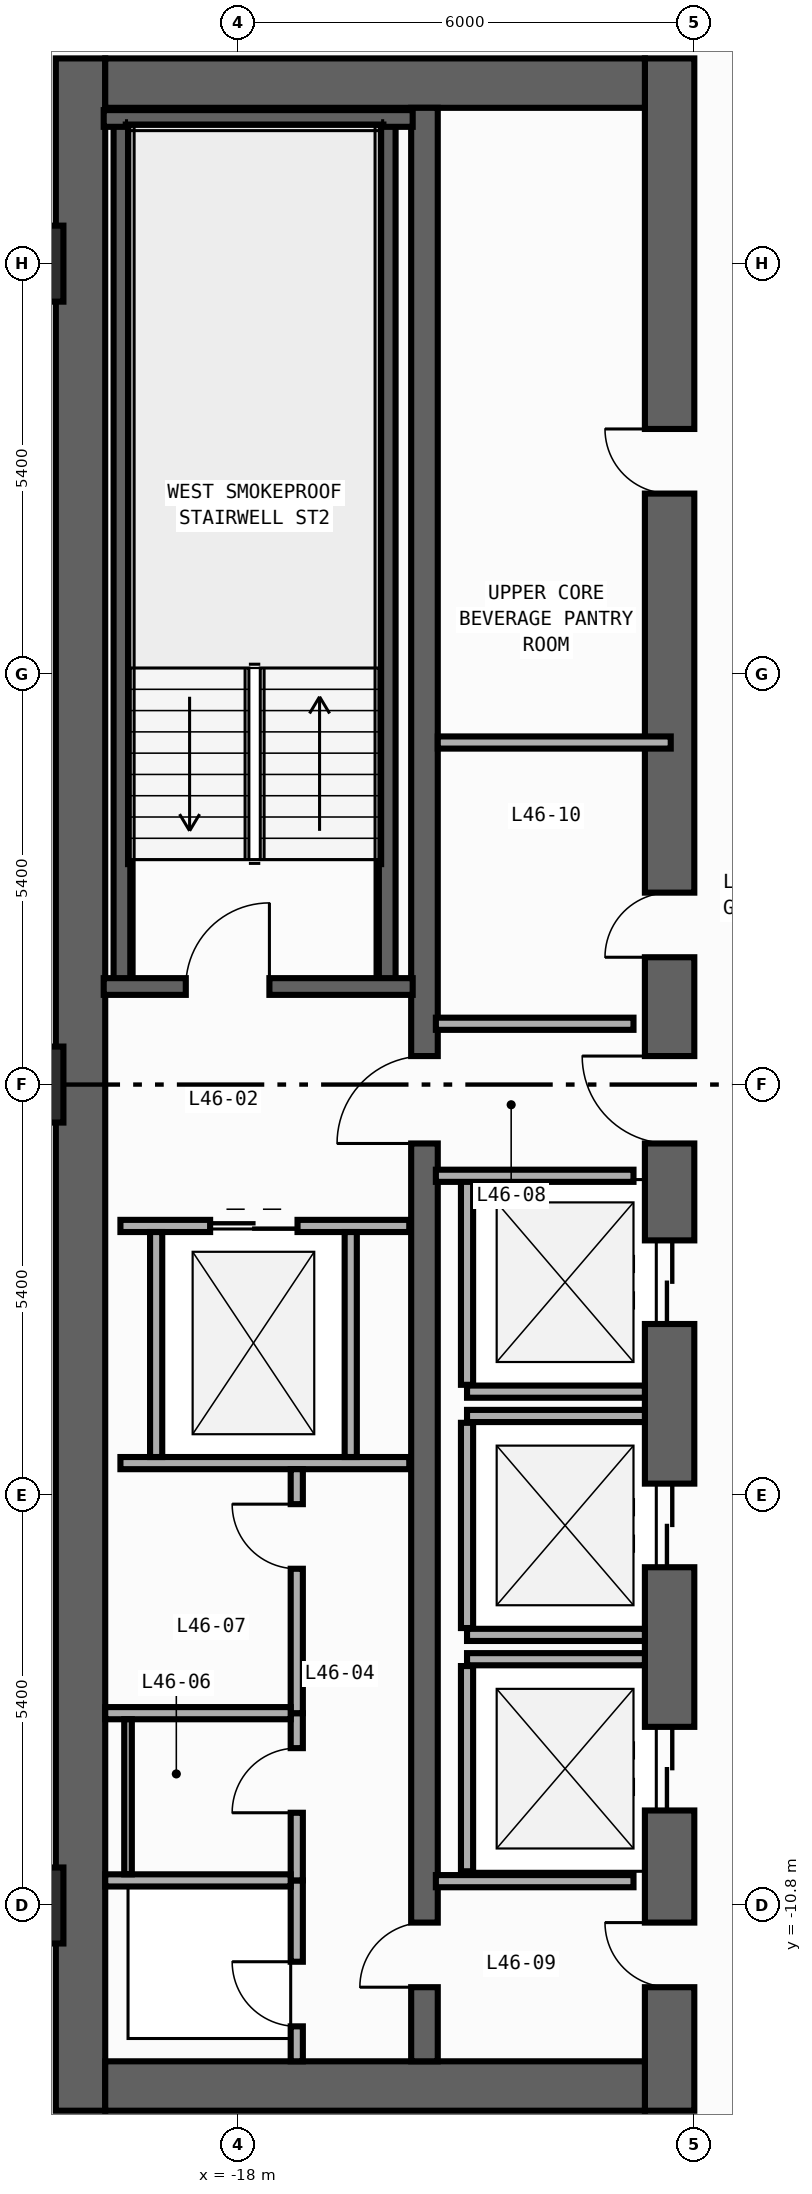
"""IFC4 building model, lengths in metres.
Left out: names, types, materials, properties, quantities, classifications, styles, units other than length and angle.
Written with IfcOpenShell. Run it as: python <this file> out.ifc"""

import sys

from ifc_helpers import new_model, si_unit, direction, frame, frame_2d, origin, origin_2d, place, context, subcontext, project, spatial, rectangle, extrude, element, fill, save


model = new_model("IFC4")
c1 = context("Model", 3, precision=1e-05, world=origin(), true_north=direction((0.0, 1.0)))
c2 = subcontext(c1, "Body", "Model", "MODEL_VIEW")
j1 = project(units=[si_unit("LENGTHUNIT", "METRE"), si_unit("PLANEANGLEUNIT", "RADIAN")], contexts=[c1])
p1 = place(None, origin())
s1 = spatial("IfcSite", under=j1, at=p1, CompositionType="ELEMENT")
p2 = place(p1, origin())
s2 = spatial("IfcBuilding", under=s1, at=p2, CompositionType="ELEMENT")
p3 = place(p2, frame((0.0, 0.0, 199.2)))
s3 = spatial("IfcBuildingStorey", under=s2, at=p3, CompositionType="ELEMENT", Elevation=199.2)
p4 = place(p3, frame((-20.075, -13.5, 0.0), z_axis=(0.0, 0.0, 1.0), x_axis=(0.0, 1.0, 0.0)))
e1 = element("IfcWall", 1, at=p4, inside=s3, PredefinedType="SHEAR", context=c2, shape_type="SweptSolid", body=[
    extrude(rectangle(XDim=27.0, YDim=0.65, at=frame_2d((13.5, 0.0))), origin(), (0.0, 0.0, 1.0), 3.54),
])
p5 = place(p3, frame((-12.325, -13.5, 0.0), z_axis=(0.0, 0.0, 1.0), x_axis=(0.0, 1.0, 0.0)))
e2 = element("IfcWall", 2, at=p5, inside=s3, PredefinedType="SHEAR", context=c2, shape_type="SweptSolid", body=[
    extrude(rectangle(XDim=27.0, YDim=0.65, at=frame_2d((13.5, 0.0))), origin(), (0.0, 0.0, 1.0), 3.54),
])
p6 = place(p5, frame((10.35, 0.0, 0.0)))
e3 = element("IfcOpeningElement", 3, at=p6, cuts=e2, PredefinedType="OPENING", context=c2, shape_type="SweptSolid", body=[
    extrude(rectangle(XDim=1.1, YDim=2.2, at=frame_2d((0.55, 1.1))), frame((0.0, 0.335, 0.0), z_axis=(0.0, -1.0, 0.0), x_axis=(1.0, 0.0, 0.0)), (0.0, 0.0, 1.0), 0.67),
])
p7 = place(p5, frame((7.15, 0.0, 0.0)))
e4 = element("IfcOpeningElement", 4, at=p7, cuts=e2, PredefinedType="OPENING", context=c2, shape_type="SweptSolid", body=[
    extrude(rectangle(XDim=1.1, YDim=2.2, at=frame_2d((0.55, 1.1))), frame((0.0, 0.335, 0.0), z_axis=(0.0, -1.0, 0.0), x_axis=(1.0, 0.0, 0.0)), (0.0, 0.0, 1.0), 0.67),
])
p8 = place(p5, frame((3.95, 0.0, 0.0)))
e5 = element("IfcOpeningElement", 5, at=p8, cuts=e2, PredefinedType="OPENING", context=c2, shape_type="SweptSolid", body=[
    extrude(rectangle(XDim=1.1, YDim=2.2, at=frame_2d((0.55, 1.1))), frame((0.0, 0.335, 0.0), z_axis=(0.0, -1.0, 0.0), x_axis=(1.0, 0.0, 0.0)), (0.0, 0.0, 1.0), 0.67),
])
p9 = place(p5, frame((15.175, 0.0, 0.0)))
e6 = element("IfcOpeningElement", 6, at=p9, cuts=e2, PredefinedType="OPENING", context=c2, shape_type="SweptSolid", body=[
    extrude(rectangle(XDim=0.85, YDim=2.1, at=frame_2d((0.425, 1.05))), frame((0.0, 0.335, 0.0), z_axis=(0.0, -1.0, 0.0), x_axis=(1.0, 0.0, 0.0)), (0.0, 0.0, 1.0), 0.67),
])
p10 = place(p5, frame((21.275, 0.0, 0.0)))
e7 = element("IfcOpeningElement", 7, at=p10, cuts=e2, PredefinedType="OPENING", context=c2, shape_type="SweptSolid", body=[
    extrude(rectangle(XDim=0.85, YDim=2.1, at=frame_2d((0.425, 1.05))), frame((0.0, 0.335, 0.0), z_axis=(0.0, -1.0, 0.0), x_axis=(1.0, 0.0, 0.0)), (0.0, 0.0, 1.0), 0.67),
])
p11 = place(p5, frame((12.725, 0.0, 0.0)))
e8 = element("IfcOpeningElement", 8, at=p11, cuts=e2, PredefinedType="OPENING", context=c2, shape_type="SweptSolid", body=[
    extrude(rectangle(XDim=1.15, YDim=2.2, at=frame_2d((0.575, 1.1))), frame((0.0, 0.335, 0.0), z_axis=(0.0, -1.0, 0.0), x_axis=(1.0, 0.0, 0.0)), (0.0, 0.0, 1.0), 0.67),
])
p12 = place(p5, frame((1.625, 0.0, 0.0)))
e9 = element("IfcOpeningElement", 9, at=p12, cuts=e2, PredefinedType="OPENING", context=c2, shape_type="SweptSolid", body=[
    extrude(rectangle(XDim=0.85, YDim=2.1, at=frame_2d((0.425, 1.05))), frame((0.0, 0.335, 0.0), z_axis=(0.0, -1.0, 0.0), x_axis=(1.0, 0.0, 0.0)), (0.0, 0.0, 1.0), 0.67),
])
for number, where, z_axis, x_axis in (
    (10, (-19.75, -13.175, 0.0), (0.0, 0.0, 1.0), (1.0, 0.0, 0.0)),
    (11, (-19.75, 13.175, 0.0), (0.0, 0.0, 1.0), (1.0, 0.0, 0.0)),
):
    element("IfcWall", number, at=place(p3, frame(where, z_axis=z_axis, x_axis=x_axis)), inside=s3, PredefinedType="SHEAR", context=c2, shape_type="SweptSolid", body=[
        extrude(rectangle(XDim=7.1, YDim=0.65, at=frame_2d((3.55, 0.0))), origin(), (0.0, 0.0, 1.0), 3.54),
    ])
p13 = place(p3, frame((-15.55, -12.85, 0.0), z_axis=(0.0, 0.0, 1.0), x_axis=(0.0, 1.0, 0.0)))
e12 = element("IfcWall", 12, at=p13, inside=s3, PredefinedType="SHEAR", context=c2, shape_type="SweptSolid", body=[
    extrude(rectangle(XDim=25.7, YDim=0.35, at=frame_2d((12.85, 0.0))), origin(), (0.0, 0.0, 1.0), 3.54),
])
p14 = place(p13, frame((12.075, 0.0, 0.0)))
e13 = element("IfcOpeningElement", 13, at=p14, cuts=e12, PredefinedType="OPENING", context=c2, shape_type="SweptSolid", body=[
    extrude(rectangle(XDim=1.15, YDim=2.2, at=frame_2d((0.575, 1.1))), frame((0.0, 0.185, 0.0), z_axis=(0.0, -1.0, 0.0), x_axis=(1.0, 0.0, 0.0)), (0.0, 0.0, 1.0), 0.37),
])
p15 = place(p13, frame((0.975, 0.0, 0.0)))
e14 = element("IfcOpeningElement", 14, at=p15, cuts=e12, PredefinedType="OPENING", context=c2, shape_type="SweptSolid", body=[
    extrude(rectangle(XDim=0.85, YDim=2.1, at=frame_2d((0.425, 1.05))), frame((0.0, 0.185, 0.0), z_axis=(0.0, -1.0, 0.0), x_axis=(1.0, 0.0, 0.0)), (0.0, 0.0, 1.0), 0.37),
])
for number, where, z_axis, x_axis in (
    (15, (-16.04, 1.29, 0.0), (0.0, 0.0, 1.0), (0.0, 1.0, 0.0)),
    (16, (-19.53, 1.29, 0.0), (0.0, 0.0, 1.0), (0.0, 1.0, 0.0)),
):
    element("IfcWall", number, at=place(p3, frame(where, z_axis=z_axis, x_axis=x_axis)), inside=s3, PredefinedType="SHEAR", context=c2, shape_type="SweptSolid", body=[
        extrude(rectangle(XDim=11.42, YDim=0.22, at=frame_2d((5.71, 0.0))), origin(), (0.0, 0.0, 1.0), 3.54),
    ])
p16 = place(p3, frame((-19.77, 12.71, 0.0), z_axis=(0.0, 0.0, 1.0), x_axis=(1.0, 0.0, 0.0)))
e17 = element("IfcWall", 17, at=p16, inside=s3, PredefinedType="SHEAR", context=c2, shape_type="SweptSolid", body=[
    extrude(rectangle(XDim=4.065, YDim=0.22, at=frame_2d((2.032, 0.0))), origin(), (0.0, 0.0, 1.0), 3.54),
])
p17 = place(p3, frame((-19.77, 1.29, 0.0), z_axis=(0.0, 0.0, 1.0), x_axis=(1.0, 0.0, 0.0)))
e18 = element("IfcWall", 18, at=p17, inside=s3, PredefinedType="SHEAR", context=c2, shape_type="SweptSolid", body=[
    extrude(rectangle(XDim=4.065, YDim=0.22, at=frame_2d((2.032, 0.0))), origin(), (0.0, 0.0, 1.0), 3.54),
])
p18 = place(p17, frame((1.08, 0.0, 0.0)))
e19 = element("IfcOpeningElement", 19, at=p18, cuts=e18, PredefinedType="OPENING", context=c2, shape_type="SweptSolid", body=[
    extrude(rectangle(XDim=1.1, YDim=2.2, at=frame_2d((0.55, 1.1))), frame((0.0, 0.12, 0.0), z_axis=(0.0, -1.0, 0.0), x_axis=(1.0, 0.0, 0.0)), (0.0, 0.0, 1.0), 0.24),
])
for number, where, z_axis, x_axis in (
    (20, (-20.8, -10.8, 0.0), (0.0, 0.0, 1.0), (1.0, 0.0, 0.0)),
    (21, (-20.8, 0.0, 0.0), (0.0, 0.0, 1.0), (1.0, 0.0, 0.0)),
    (22, (-20.8, 10.8, 0.0), (0.0, 0.0, 1.0), (1.0, 0.0, 0.0)),
):
    element("IfcColumn", number, at=place(p3, frame(where, z_axis=z_axis, x_axis=x_axis)), inside=s3, PredefinedType="COLUMN", context=c2, shape_type="SweptSolid", body=[
        extrude(rectangle(XDim=1.0, YDim=1.0, at=origin_2d()), origin(), (0.0, 0.0, 1.0), 3.8),
    ])
p19 = place(p3, frame((-14.99, -4.04, 0.0), z_axis=(0.0, 0.0, 1.0), x_axis=(1.0, 0.0, 0.0)))
e23 = element("IfcWall", 23, at=p19, inside=s3, PredefinedType="STANDARD", context=c2, shape_type="SweptSolid", body=[
    extrude(rectangle(XDim=2.34, YDim=0.16, at=frame_2d((1.17, 0.0))), origin(), (0.0, 0.0, 1.0), 3.54),
])
p20 = place(p3, frame((-14.99, -3.95, 0.0), z_axis=(0.0, 0.0, 1.0), x_axis=(0.0, 1.0, 0.0)))
e24 = element("IfcWall", 24, at=p20, inside=s3, PredefinedType="STANDARD", context=c2, shape_type="SweptSolid", body=[
    extrude(rectangle(XDim=2.7, YDim=0.16, at=frame_2d((1.35, 0.0))), origin(), (0.0, 0.0, 1.0), 3.54),
])
for number, where, z_axis, x_axis in (
    (25, (-14.99, -7.24, 0.0), (0.0, 0.0, 1.0), (1.0, 0.0, 0.0)),
    (26, (-14.99, -4.36, 0.0), (0.0, 0.0, 1.0), (1.0, 0.0, 0.0)),
):
    element("IfcWall", number, at=place(p3, frame(where, z_axis=z_axis, x_axis=x_axis)), inside=s3, PredefinedType="STANDARD", context=c2, shape_type="SweptSolid", body=[
        extrude(rectangle(XDim=2.34, YDim=0.16, at=frame_2d((1.17, 0.0))), origin(), (0.0, 0.0, 1.0), 3.54),
    ])
p21 = place(p3, frame((-14.99, -7.15, 0.0), z_axis=(0.0, 0.0, 1.0), x_axis=(0.0, 1.0, 0.0)))
e27 = element("IfcWall", 27, at=p21, inside=s3, PredefinedType="STANDARD", context=c2, shape_type="SweptSolid", body=[
    extrude(rectangle(XDim=2.7, YDim=0.16, at=frame_2d((1.35, 0.0))), origin(), (0.0, 0.0, 1.0), 3.54),
])
p22 = place(p3, frame((-14.99, -7.56, 0.0), z_axis=(0.0, 0.0, 1.0), x_axis=(1.0, 0.0, 0.0)))
e28 = element("IfcWall", 28, at=p22, inside=s3, PredefinedType="STANDARD", context=c2, shape_type="SweptSolid", body=[
    extrude(rectangle(XDim=2.34, YDim=0.16, at=frame_2d((1.17, 0.0))), origin(), (0.0, 0.0, 1.0), 3.54),
])
p23 = place(p3, frame((-14.99, -10.35, 0.0), z_axis=(0.0, 0.0, 1.0), x_axis=(0.0, 1.0, 0.0)))
e29 = element("IfcWall", 29, at=p23, inside=s3, PredefinedType="STANDARD", context=c2, shape_type="SweptSolid", body=[
    extrude(rectangle(XDim=2.7, YDim=0.16, at=frame_2d((1.35, 0.0))), origin(), (0.0, 0.0, 1.0), 3.54),
])
p24 = place(p3, frame((-19.55, -1.86, 0.0), z_axis=(0.0, 0.0, 1.0), x_axis=(1.0, 0.0, 0.0)))
e30 = element("IfcWall", 30, at=p24, inside=s3, PredefinedType="STANDARD", context=c2, shape_type="SweptSolid", body=[
    extrude(rectangle(XDim=3.8, YDim=0.16, at=frame_2d((1.9, 0.0))), origin(), (0.0, 0.0, 1.0), 3.54),
])
p25 = place(p24, frame((1.18, 0.0, 0.0)))
e31 = element("IfcOpeningElement", 31, at=p25, cuts=e30, PredefinedType="OPENING", context=c2, shape_type="SweptSolid", body=[
    extrude(rectangle(XDim=1.15, YDim=2.2, at=frame_2d((0.575, 1.1))), frame((0.0, 0.09, 0.0), z_axis=(0.0, -1.0, 0.0), x_axis=(1.0, 0.0, 0.0)), (0.0, 0.0, 1.0), 0.18),
])
p26 = place(p3, frame((-19.55, -4.98, 0.0), z_axis=(0.0, 0.0, 1.0), x_axis=(1.0, 0.0, 0.0)))
e32 = element("IfcWall", 32, at=p26, inside=s3, PredefinedType="STANDARD", context=c2, shape_type="SweptSolid", body=[
    extrude(rectangle(XDim=3.8, YDim=0.16, at=frame_2d((1.9, 0.0))), origin(), (0.0, 0.0, 1.0), 3.54),
])
for number, where, z_axis, x_axis in (
    (33, (-19.08, -4.9, 0.0), (0.0, 0.0, 1.0), (0.0, 1.0, 0.0)),
    (34, (-16.52, -4.9, 0.0), (0.0, 0.0, 1.0), (0.0, 1.0, 0.0)),
):
    element("IfcWall", number, at=place(p3, frame(where, z_axis=z_axis, x_axis=x_axis)), inside=s3, PredefinedType="STANDARD", context=c2, shape_type="SweptSolid", body=[
        extrude(rectangle(XDim=2.96, YDim=0.16, at=frame_2d((1.48, 0.0))), origin(), (0.0, 0.0, 1.0), 3.54),
    ])
for number, where, z_axis, x_axis in (
    (35, (-15.4, 0.8, 0.0), (0.0, 0.0, 1.0), (1.0, 0.0, 0.0)),
    (36, (-15.4, -1.2, 0.0), (0.0, 0.0, 1.0), (1.0, 0.0, 0.0)),
    (37, (-15.4, -10.48, 0.0), (0.0, 0.0, 1.0), (1.0, 0.0, 0.0)),
):
    element("IfcWall", number, at=place(p3, frame(where, z_axis=z_axis, x_axis=x_axis)), inside=s3, PredefinedType="STANDARD", context=c2, shape_type="SweptSolid", body=[
        extrude(rectangle(XDim=2.6, YDim=0.16, at=frame_2d((1.3, 0.0))), origin(), (0.0, 0.0, 1.0), 3.54),
    ])
p27 = place(p3, frame((-17.23, -12.85, 0.0), z_axis=(0.0, 0.0, 1.0), x_axis=(0.0, 1.0, 0.0)))
e38 = element("IfcWall", 38, at=p27, inside=s3, PredefinedType="PARTITIONING", context=c2, shape_type="SweptSolid", body=[
    extrude(rectangle(XDim=2.38, YDim=0.16, at=frame_2d((1.19, 0.0))), origin(), (0.0, 0.0, 1.0), 3.54),
])
p28 = place(p27, frame((0.46, 0.0, 0.0)))
e39 = element("IfcOpeningElement", 39, at=p28, cuts=e38, PredefinedType="OPENING", context=c2, shape_type="SweptSolid", body=[
    extrude(rectangle(XDim=0.85, YDim=2.1, at=frame_2d((0.425, 1.05))), frame((0.0, 0.09, 0.0), z_axis=(0.0, -1.0, 0.0), x_axis=(1.0, 0.0, 0.0)), (0.0, 0.0, 1.0), 0.18),
])
p29 = place(p3, frame((-17.23, -10.47, 0.0), z_axis=(0.0, 0.0, 1.0), x_axis=(0.0, 1.0, 0.0)))
e40 = element("IfcWall", 40, at=p29, inside=s3, PredefinedType="PARTITIONING", context=c2, shape_type="SweptSolid", body=[
    extrude(rectangle(XDim=2.2, YDim=0.16, at=frame_2d((1.1, 0.0))), origin(), (0.0, 0.0, 1.0), 3.54),
])
p30 = place(p29, frame((0.89, 0.0, 0.0)))
e41 = element("IfcOpeningElement", 41, at=p30, cuts=e40, PredefinedType="OPENING", context=c2, shape_type="SweptSolid", body=[
    extrude(rectangle(XDim=0.85, YDim=2.1, at=frame_2d((0.425, 1.05))), frame((0.0, 0.09, 0.0), z_axis=(0.0, -1.0, 0.0), x_axis=(1.0, 0.0, 0.0)), (0.0, 0.0, 1.0), 0.18),
])
p31 = place(p3, frame((-17.23, -8.27, 0.0), z_axis=(0.0, 0.0, 1.0), x_axis=(0.0, 1.0, 0.0)))
e42 = element("IfcWall", 42, at=p31, inside=s3, PredefinedType="PARTITIONING", context=c2, shape_type="SweptSolid", body=[
    extrude(rectangle(XDim=3.21, YDim=0.16, at=frame_2d((1.605, 0.0))), origin(), (0.0, 0.0, 1.0), 3.54),
])
p32 = place(p31, frame((1.9, 0.0, 0.0)))
e43 = element("IfcOpeningElement", 43, at=p32, cuts=e42, PredefinedType="OPENING", context=c2, shape_type="SweptSolid", body=[
    extrude(rectangle(XDim=0.85, YDim=2.1, at=frame_2d((0.425, 1.05))), frame((0.0, 0.09, 0.0), z_axis=(0.0, -1.0, 0.0), x_axis=(1.0, 0.0, 0.0)), (0.0, 0.0, 1.0), 0.18),
])
for number, where, z_axis, x_axis in (
    (44, (-19.75, -10.47, 0.0), (0.0, 0.0, 1.0), (1.0, 0.0, 0.0)),
    (45, (-19.75, -8.27, 0.0), (0.0, 0.0, 1.0), (1.0, 0.0, 0.0)),
):
    element("IfcWall", number, at=place(p3, frame(where, z_axis=z_axis, x_axis=x_axis)), inside=s3, PredefinedType="PARTITIONING", context=c2, shape_type="SweptSolid", body=[
        extrude(rectangle(XDim=2.44, YDim=0.16, at=frame_2d((1.22, 0.0))), origin(), (0.0, 0.0, 1.0), 3.54),
    ])
p33 = place(p3, frame((-15.375, 4.5, 0.0), z_axis=(0.0, 0.0, 1.0), x_axis=(1.0, 0.0, 0.0)))
e46 = element("IfcWall", 46, at=p33, inside=s3, PredefinedType="PARTITIONING", context=c2, shape_type="SweptSolid", body=[
    extrude(rectangle(XDim=3.065, YDim=0.16, at=frame_2d((1.532, 0.0))), origin(), (0.0, 0.0, 1.0), 3.54),
])
p34 = place(p3, frame((-19.45, -10.39, 0.0), z_axis=(0.0, 0.0, 1.0), x_axis=(0.0, 1.0, 0.0)))
e47 = element("IfcWall", 47, at=p34, inside=s3, PredefinedType="PARTITIONING", context=c2, shape_type="SweptSolid", body=[
    extrude(rectangle(XDim=2.04, YDim=0.1, at=frame_2d((1.02, 0.0))), origin(), (0.0, 0.0, 1.0), 3.54),
])
p35 = place(p18, origin())
e48 = element("IfcDoor", 48, at=p35, inside=s3, OperationType="SINGLE_SWING_RIGHT", PredefinedType="DOOR", context=c2, shape_type="SweptSolid", body=[
    extrude(rectangle(XDim=1.1, YDim=2.2, at=frame_2d((0.55, 1.1))), frame((0.0, 0.025, 0.0), z_axis=(0.0, -1.0, 0.0), x_axis=(1.0, 0.0, 0.0)), (0.0, 0.0, 1.0), 0.05),
])
fill(e19, e48)
p36 = place(p6, origin())
e49 = element("IfcDoor", 49, at=p36, inside=s3, OperationType="DOUBLE_DOOR_SLIDING", PredefinedType="DOOR", context=c2, shape_type="SweptSolid", body=[
    extrude(rectangle(XDim=1.1, YDim=2.2, at=frame_2d((0.55, 1.1))), frame((0.0, 0.025, 0.0), z_axis=(0.0, -1.0, 0.0), x_axis=(1.0, 0.0, 0.0)), (0.0, 0.0, 1.0), 0.05),
])
fill(e3, e49)
p37 = place(p7, origin())
e50 = element("IfcDoor", 50, at=p37, inside=s3, OperationType="DOUBLE_DOOR_SLIDING", PredefinedType="DOOR", context=c2, shape_type="SweptSolid", body=[
    extrude(rectangle(XDim=1.1, YDim=2.2, at=frame_2d((0.55, 1.1))), frame((0.0, 0.025, 0.0), z_axis=(0.0, -1.0, 0.0), x_axis=(1.0, 0.0, 0.0)), (0.0, 0.0, 1.0), 0.05),
])
fill(e4, e50)
p38 = place(p8, origin())
e51 = element("IfcDoor", 51, at=p38, inside=s3, OperationType="DOUBLE_DOOR_SLIDING", PredefinedType="DOOR", context=c2, shape_type="SweptSolid", body=[
    extrude(rectangle(XDim=1.1, YDim=2.2, at=frame_2d((0.55, 1.1))), frame((0.0, 0.025, 0.0), z_axis=(0.0, -1.0, 0.0), x_axis=(1.0, 0.0, 0.0)), (0.0, 0.0, 1.0), 0.05),
])
fill(e5, e51)
p39 = place(p9, origin())
e52 = element("IfcDoor", 52, at=p39, inside=s3, OperationType="SINGLE_SWING_LEFT", PredefinedType="DOOR", context=c2, shape_type="SweptSolid", body=[
    extrude(rectangle(XDim=0.85, YDim=2.1, at=frame_2d((0.425, 1.05))), frame((0.0, 0.025, 0.0), z_axis=(0.0, -1.0, 0.0), x_axis=(1.0, 0.0, 0.0)), (0.0, 0.0, 1.0), 0.05),
])
fill(e6, e52)
p40 = place(p10, origin())
e53 = element("IfcDoor", 53, at=p40, inside=s3, OperationType="SINGLE_SWING_RIGHT", PredefinedType="DOOR", context=c2, shape_type="SweptSolid", body=[
    extrude(rectangle(XDim=0.85, YDim=2.1, at=frame_2d((0.425, 1.05))), frame((0.0, 0.025, 0.0), z_axis=(0.0, -1.0, 0.0), x_axis=(1.0, 0.0, 0.0)), (0.0, 0.0, 1.0), 0.05),
])
fill(e7, e53)
p41 = place(p11, origin())
e54 = element("IfcDoor", 54, at=p41, inside=s3, OperationType="SINGLE_SWING_RIGHT", PredefinedType="DOOR", context=c2, shape_type="SweptSolid", body=[
    extrude(rectangle(XDim=1.15, YDim=2.2, at=frame_2d((0.575, 1.1))), frame((0.0, 0.025, 0.0), z_axis=(0.0, -1.0, 0.0), x_axis=(1.0, 0.0, 0.0)), (0.0, 0.0, 1.0), 0.05),
])
fill(e8, e54)
p42 = place(p14, origin())
e55 = element("IfcDoor", 55, at=p42, inside=s3, OperationType="SINGLE_SWING_LEFT", PredefinedType="DOOR", context=c2, shape_type="SweptSolid", body=[
    extrude(rectangle(XDim=1.15, YDim=2.2, at=frame_2d((0.575, 1.1))), frame((0.0, 0.025, 0.0), z_axis=(0.0, -1.0, 0.0), x_axis=(1.0, 0.0, 0.0)), (0.0, 0.0, 1.0), 0.05),
])
fill(e13, e55)
p43 = place(p12, origin())
e56 = element("IfcDoor", 56, at=p43, inside=s3, OperationType="SINGLE_SWING_RIGHT", PredefinedType="DOOR", context=c2, shape_type="SweptSolid", body=[
    extrude(rectangle(XDim=0.85, YDim=2.1, at=frame_2d((0.425, 1.05))), frame((0.0, 0.025, 0.0), z_axis=(0.0, -1.0, 0.0), x_axis=(1.0, 0.0, 0.0)), (0.0, 0.0, 1.0), 0.05),
])
fill(e9, e56)
p44 = place(p15, origin())
e57 = element("IfcDoor", 57, at=p44, inside=s3, OperationType="SINGLE_SWING_LEFT", PredefinedType="DOOR", context=c2, shape_type="SweptSolid", body=[
    extrude(rectangle(XDim=0.85, YDim=2.1, at=frame_2d((0.425, 1.05))), frame((0.0, 0.025, 0.0), z_axis=(0.0, -1.0, 0.0), x_axis=(1.0, 0.0, 0.0)), (0.0, 0.0, 1.0), 0.05),
])
fill(e14, e57)
p45 = place(p25, origin())
e58 = element("IfcDoor", 58, at=p45, inside=s3, OperationType="DOUBLE_DOOR_SLIDING", PredefinedType="DOOR", context=c2, shape_type="SweptSolid", body=[
    extrude(rectangle(XDim=1.15, YDim=2.2, at=frame_2d((0.575, 1.1))), frame((0.0, 0.025, 0.0), z_axis=(0.0, -1.0, 0.0), x_axis=(1.0, 0.0, 0.0)), (0.0, 0.0, 1.0), 0.05),
])
fill(e31, e58)
p46 = place(p28, origin())
e59 = element("IfcDoor", 59, at=p46, inside=s3, OperationType="SINGLE_SWING_RIGHT", PredefinedType="DOOR", context=c2, shape_type="SweptSolid", body=[
    extrude(rectangle(XDim=0.85, YDim=2.1, at=frame_2d((0.425, 1.05))), frame((0.0, 0.025, 0.0), z_axis=(0.0, -1.0, 0.0), x_axis=(1.0, 0.0, 0.0)), (0.0, 0.0, 1.0), 0.05),
])
fill(e39, e59)
p47 = place(p30, origin())
e60 = element("IfcDoor", 60, at=p47, inside=s3, OperationType="SINGLE_SWING_LEFT", PredefinedType="DOOR", context=c2, shape_type="SweptSolid", body=[
    extrude(rectangle(XDim=0.85, YDim=2.1, at=frame_2d((0.425, 1.05))), frame((0.0, 0.025, 0.0), z_axis=(0.0, -1.0, 0.0), x_axis=(1.0, 0.0, 0.0)), (0.0, 0.0, 1.0), 0.05),
])
fill(e41, e60)
p48 = place(p32, origin())
e61 = element("IfcDoor", 61, at=p48, inside=s3, OperationType="SINGLE_SWING_RIGHT", PredefinedType="DOOR", context=c2, shape_type="SweptSolid", body=[
    extrude(rectangle(XDim=0.85, YDim=2.1, at=frame_2d((0.425, 1.05))), frame((0.0, 0.025, 0.0), z_axis=(0.0, -1.0, 0.0), x_axis=(1.0, 0.0, 0.0)), (0.0, 0.0, 1.0), 0.05),
])
fill(e43, e61)
save(model, sys.argv[1])
